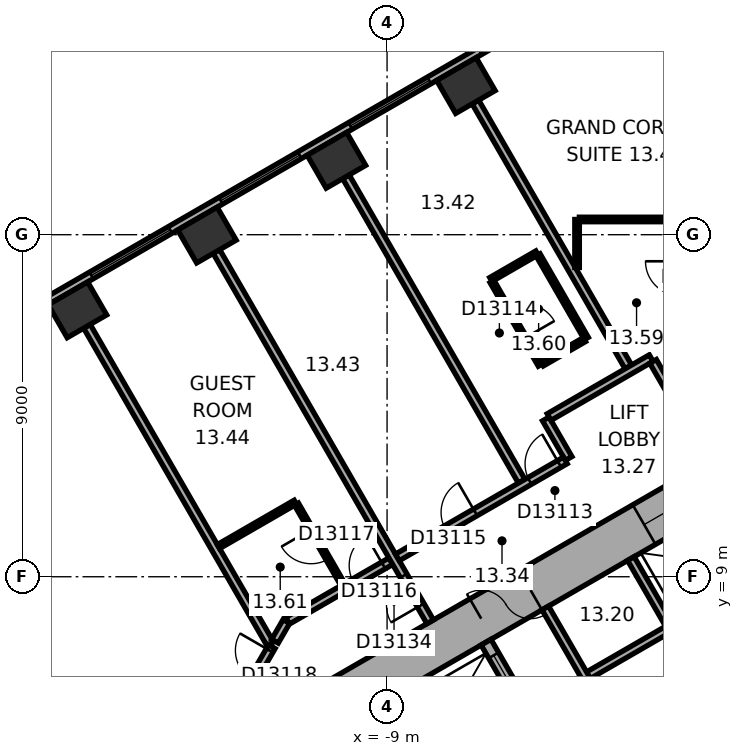
"""IFC4 building model, lengths in metres.
Left out: names, types, materials, properties, quantities, classifications, styles, units other than length and angle.
Written with IfcOpenShell. Run it as: python <this file> out.ifc"""

import sys

from ifc_helpers import new_model, si_unit, direction, frame, frame_2d, origin, origin_2d, place, context, subcontext, project, spatial, rectangle, extrude, element, fill, save


model = new_model("IFC4")
c1 = context("Model", 3, precision=1e-05, world=origin(), true_north=direction((0.0, 1.0)))
c2 = subcontext(c1, "Body", "Model", "MODEL_VIEW")
j1 = project(units=[si_unit("LENGTHUNIT", "METRE"), si_unit("PLANEANGLEUNIT", "RADIAN")], contexts=[c1])
p1 = place(None, origin())
s1 = spatial("IfcSite", under=j1, at=p1, CompositionType="ELEMENT")
p2 = place(p1, origin())
s2 = spatial("IfcBuilding", under=s1, at=p2, CompositionType="ELEMENT")
p3 = place(p2, frame((0.0, 0.0, 63.8)))
s3 = spatial("IfcBuildingStorey", under=s2, at=p3, CompositionType="ELEMENT", Elevation=63.8)
for number, where, z_axis, x_axis in (
    (1, (-6.926, 21.925, 0.0), (0.0, 0.0, 1.0), (-0.866, -0.5, 0.0)),
    (2, (-10.333, 19.957, 0.0), (0.0, 0.0, 1.0), (-0.866, -0.5, 0.0)),
    (3, (-13.74, 17.99, 0.0), (0.0, 0.0, 1.0), (-0.866, -0.5, 0.0)),
    (4, (-17.148, 16.023, 0.0), (0.0, 0.0, 1.0), (-0.866, -0.5, 0.0)),
):
    element("IfcColumn", number, at=place(p3, frame(where, z_axis=z_axis, x_axis=x_axis)), inside=s3, PredefinedType="COLUMN", context=c2, shape_type="SweptSolid", body=[
        extrude(rectangle(XDim=1.2, YDim=1.0, at=origin_2d()), origin(), (0.0, 0.0, 1.0), 3.3),
    ])
p4 = place(p3, frame((0.3, 11.836, 0.0), z_axis=(0.0, 0.0, 1.0), x_axis=(-0.866021384402, -0.500006961711, 0.0)))
e5 = element("IfcWall", 5, at=p4, inside=s3, PredefinedType="SHEAR", context=c2, shape_type="SweptSolid", body=[
    extrude(rectangle(XDim=12.355, YDim=1.2, at=frame_2d((6.178, 0.0))), origin(), (0.0, 0.0, 1.0), 3.3),
])
p5 = place(p4, frame((6.378, 0.0, 0.0)))
e6 = element("IfcOpeningElement", 6, at=p5, cuts=e5, PredefinedType="OPENING", context=c2, shape_type="SweptSolid", body=[
    extrude(rectangle(XDim=1.5, YDim=2.1, at=frame_2d((0.75, 1.05))), frame((0.0, 0.61, 0.0), z_axis=(0.0, -1.0, 0.0), x_axis=(1.0, 0.0, 0.0)), (0.0, 0.0, 1.0), 1.22),
])
p6 = place(p4, frame((1.828, 0.0, 0.0)))
e7 = element("IfcOpeningElement", 7, at=p6, cuts=e5, PredefinedType="OPENING", context=c2, shape_type="SweptSolid", body=[
    extrude(rectangle(XDim=1.1, YDim=2.1, at=frame_2d((0.55, 1.05))), frame((0.0, 0.61, 0.0), z_axis=(0.0, -1.0, 0.0), x_axis=(1.0, 0.0, 0.0)), (0.0, 0.0, 1.0), 1.22),
])
p7 = place(p3, frame((-3.136, 24.805, 0.0), z_axis=(0.0, 0.0, 1.0), x_axis=(-0.866028291626, -0.499994998079, 0.0)))
e8 = element("IfcWall", 8, at=p7, inside=s3, PredefinedType="STANDARD", context=c2, shape_type="SweptSolid", body=[
    extrude(rectangle(XDim=21.246, YDim=0.2, at=frame_2d((10.623, 0.0))), origin(), (0.0, 0.0, 1.0), 3.3),
])
p8 = place(p7, frame((1.555, 0.0, 0.8)))
e9 = element("IfcOpeningElement", 9, at=p8, cuts=e8, PredefinedType="OPENING", context=c2, shape_type="SweptSolid", body=[
    extrude(rectangle(XDim=2.4, YDim=1.7, at=frame_2d((1.2, 0.85))), frame((0.0, 0.11, 0.0), z_axis=(0.0, -1.0, 0.0), x_axis=(1.0, 0.0, 0.0)), (0.0, 0.0, 1.0), 0.22),
])
p9 = place(p7, frame((5.489, 0.0, 0.8)))
e10 = element("IfcOpeningElement", 10, at=p9, cuts=e8, PredefinedType="OPENING", context=c2, shape_type="SweptSolid", body=[
    extrude(rectangle(XDim=2.4, YDim=1.7, at=frame_2d((1.2, 0.85))), frame((0.0, 0.11, 0.0), z_axis=(0.0, -1.0, 0.0), x_axis=(1.0, 0.0, 0.0)), (0.0, 0.0, 1.0), 0.22),
])
p10 = place(p7, frame((9.424, 0.0, 0.8)))
e11 = element("IfcOpeningElement", 11, at=p10, cuts=e8, PredefinedType="OPENING", context=c2, shape_type="SweptSolid", body=[
    extrude(rectangle(XDim=2.4, YDim=1.7, at=frame_2d((1.2, 0.85))), frame((0.0, 0.11, 0.0), z_axis=(0.0, -1.0, 0.0), x_axis=(1.0, 0.0, 0.0)), (0.0, 0.0, 1.0), 0.22),
])
p11 = place(p7, frame((13.358, 0.0, 0.8)))
e12 = element("IfcOpeningElement", 12, at=p11, cuts=e8, PredefinedType="OPENING", context=c2, shape_type="SweptSolid", body=[
    extrude(rectangle(XDim=2.4, YDim=1.7, at=frame_2d((1.2, 0.85))), frame((0.0, 0.11, 0.0), z_axis=(0.0, -1.0, 0.0), x_axis=(1.0, 0.0, 0.0)), (0.0, 0.0, 1.0), 0.22),
])
p12 = place(p7, frame((17.293, 0.0, 0.8)))
e13 = element("IfcOpeningElement", 13, at=p12, cuts=e8, PredefinedType="OPENING", context=c2, shape_type="SweptSolid", body=[
    extrude(rectangle(XDim=2.4, YDim=1.7, at=frame_2d((1.2, 0.85))), frame((0.0, 0.11, 0.0), z_axis=(0.0, -1.0, 0.0), x_axis=(1.0, 0.0, 0.0)), (0.0, 0.0, 1.0), 0.22),
])
p13 = place(p3, frame((0.803, 9.009, 0.0), z_axis=(0.0, 0.0, 1.0), x_axis=(-0.866028230842, -0.499995103361, 0.0)))
e14 = element("IfcWall", 14, at=p13, inside=s3, PredefinedType="PARTITIONING", context=c2, shape_type="SweptSolid", body=[
    extrude(rectangle(XDim=5.4, YDim=0.2, at=frame_2d((2.7, 0.0))), origin(), (0.0, 0.0, 1.0), 3.05),
])
for number, where, z_axis, x_axis in (
    (15, (-1.485, 7.572, 0.0), (0.0, 0.0, 1.0), (-0.5, 0.866, 0.0)),
    (16, (-3.737, 6.272, 0.0), (0.0, 0.0, 1.0), (-0.5, 0.866, 0.0)),
):
    element("IfcWall", number, at=place(p3, frame(where, z_axis=z_axis, x_axis=x_axis)), inside=s3, PredefinedType="PARTITIONING", context=c2, shape_type="SweptSolid", body=[
        extrude(rectangle(XDim=2.2, YDim=0.2, at=frame_2d((1.1, 0.0))), origin(), (0.0, 0.0, 1.0), 3.05),
    ])
p14 = place(p3, frame((-2.216, 4.282, 0.0), z_axis=(0.0, 0.0, 1.0), x_axis=(0.499977259774, 0.866038532462, 0.0)))
e17 = element("IfcWall", 17, at=p14, inside=s3, PredefinedType="SHEAR", context=c2, shape_type="SweptSolid", body=[
    extrude(rectangle(XDim=4.7, YDim=0.3, at=frame_2d((2.35, 0.0))), origin(), (0.0, 0.0, 1.0), 3.05),
])
p15 = place(p3, frame((-5.295, 5.372, 0.0), z_axis=(0.0, 0.0, 1.0), x_axis=(-0.500077893725, 0.86598042715, 0.0)))
e18 = element("IfcWall", 18, at=p15, inside=s3, PredefinedType="SHEAR", context=c2, shape_type="SweptSolid", body=[
    extrude(rectangle(XDim=2.2, YDim=0.3, at=frame_2d((1.1, 0.0))), origin(), (0.0, 0.0, 1.0), 3.05),
])
p16 = place(p15, frame((0.7, 0.0, 0.0)))
e19 = element("IfcOpeningElement", 19, at=p16, cuts=e18, PredefinedType="OPENING", context=c2, shape_type="SweptSolid", body=[
    extrude(rectangle(XDim=1.1, YDim=2.1, at=frame_2d((0.55, 1.05))), frame((0.0, 0.16, 0.0), z_axis=(0.0, -1.0, 0.0), x_axis=(1.0, 0.0, 0.0)), (0.0, 0.0, 1.0), 0.32),
])
p17 = place(p3, frame((-16.898, 15.59, 0.0), z_axis=(0.0, 0.0, 1.0), x_axis=(0.499994742786, -0.866028439017, 0.0)))
e20 = element("IfcWall", 20, at=p17, inside=s3, PredefinedType="PARTITIONING", context=c2, shape_type="SweptSolid", body=[
    extrude(rectangle(XDim=9.65, YDim=0.2, at=frame_2d((4.825, 0.0))), origin(), (0.0, 0.0, 1.0), 3.05),
])
p18 = place(p3, frame((-13.436, 9.794, 0.0), z_axis=(0.0, 0.0, 1.0), x_axis=(0.866053246676, 0.499951771596, 0.0)))
e21 = element("IfcWall", 21, at=p18, inside=s3, PredefinedType="PARTITIONING", context=c2, shape_type="SweptSolid", body=[
    extrude(rectangle(XDim=2.335, YDim=0.12, at=frame_2d((1.167, 0.0))), origin(), (0.0, 0.0, 1.0), 3.05),
])
p19 = place(p3, frame((-12.032, 7.162, 0.0), z_axis=(0.0, 0.0, 1.0), x_axis=(-0.499951829968, -0.866053212979, 0.0)))
e22 = element("IfcWall", 22, at=p19, inside=s3, PredefinedType="PARTITIONING", context=c2, shape_type="SweptSolid", body=[
    extrude(rectangle(XDim=1.136, YDim=0.2, at=frame_2d((0.568, 0.0))), origin(), (0.0, 0.0, 1.0), 3.05),
])
p20 = place(p19, frame((0.118, 0.0, 0.0)))
e23 = element("IfcOpeningElement", 23, at=p20, cuts=e22, PredefinedType="OPENING", context=c2, shape_type="SweptSolid", body=[
    extrude(rectangle(XDim=0.9, YDim=2.1, at=frame_2d((0.45, 1.05))), frame((0.0, 0.11, 0.0), z_axis=(0.0, -1.0, 0.0), x_axis=(1.0, 0.0, 0.0)), (0.0, 0.0, 1.0), 0.22),
])
p21 = place(p3, frame((-11.65, 7.823, 0.0), z_axis=(0.0, 0.0, 1.0), x_axis=(-0.50012165622, -0.865955154139, 0.0)))
e24 = element("IfcWall", 24, at=p21, inside=s3, PredefinedType="PARTITIONING", context=c2, shape_type="SweptSolid", body=[
    extrude(rectangle(XDim=0.6, YDim=0.2, at=frame_2d((0.3, 0.0))), origin(), (0.0, 0.0, 1.0), 3.05),
])
p22 = place(p3, frame((-11.385, 10.909, 0.0), z_axis=(0.0, 0.0, 1.0), x_axis=(0.500077547548, -0.865980627057, 0.0)))
e25 = element("IfcWall", 25, at=p22, inside=s3, PredefinedType="PARTITIONING", context=c2, shape_type="SweptSolid", body=[
    extrude(rectangle(XDim=2.44, YDim=0.12, at=frame_2d((1.22, 0.0))), origin(), (0.0, 0.0, 1.0), 3.05),
])
p23 = place(p22, frame((0.77, 0.0, 0.0)))
e26 = element("IfcOpeningElement", 26, at=p23, cuts=e25, PredefinedType="OPENING", context=c2, shape_type="SweptSolid", body=[
    extrude(rectangle(XDim=0.9, YDim=2.1, at=frame_2d((0.45, 1.05))), frame((0.0, 0.07, 0.0), z_axis=(0.0, -1.0, 0.0), x_axis=(1.0, 0.0, 0.0)), (0.0, 0.0, 1.0), 0.14),
])
p24 = place(p3, frame((-10.083, 19.524, 0.0), z_axis=(0.0, 0.0, 1.0), x_axis=(0.499999662836, -0.866025598446, 0.0)))
e27 = element("IfcWall", 27, at=p24, inside=s3, PredefinedType="PARTITIONING", context=c2, shape_type="SweptSolid", body=[
    extrude(rectangle(XDim=9.25, YDim=0.2, at=frame_2d((4.625, 0.0))), origin(), (0.0, 0.0, 1.0), 2.6),
])
p25 = place(p3, frame((-8.902, 9.41, 0.0), z_axis=(0.0, 0.0, 1.0), x_axis=(-0.866014299198, -0.500019233215, 0.0)))
e28 = element("IfcWall", 28, at=p25, inside=s3, PredefinedType="PARTITIONING", context=c2, shape_type="SweptSolid", body=[
    extrude(rectangle(XDim=3.133, YDim=0.2, at=frame_2d((1.567, 0.0))), origin(), (0.0, 0.0, 1.0), 3.05),
])
p26 = place(p25, frame((0.225, 0.0, 0.0)))
e29 = element("IfcOpeningElement", 29, at=p26, cuts=e28, PredefinedType="OPENING", context=c2, shape_type="SweptSolid", body=[
    extrude(rectangle(XDim=0.9, YDim=2.1, at=frame_2d((0.45, 1.05))), frame((0.0, 0.11, 0.0), z_axis=(0.0, -1.0, 0.0), x_axis=(1.0, 0.0, 0.0)), (0.0, 0.0, 1.0), 0.22),
])
p27 = place(p3, frame((-7.865, 7.814, 0.0), z_axis=(0.0, 0.0, 1.0), x_axis=(-0.500004234368, 0.866022959057, 0.0)))
e30 = element("IfcWall", 30, at=p27, inside=s3, PredefinedType="PARTITIONING", context=c2, shape_type="SweptSolid", body=[
    extrude(rectangle(XDim=11.25, YDim=0.2, at=frame_2d((5.625, 0.0))), origin(), (0.0, 0.0, 1.0), 3.05),
])
p28 = place(p27, frame((0.5, 0.0, 0.0)))
e31 = element("IfcOpeningElement", 31, at=p28, cuts=e30, PredefinedType="OPENING", context=c2, shape_type="SweptSolid", body=[
    extrude(rectangle(XDim=0.9, YDim=2.1, at=frame_2d((0.45, 1.05))), frame((0.0, 0.11, 0.0), z_axis=(0.0, -1.0, 0.0), x_axis=(1.0, 0.0, 0.0)), (0.0, 0.0, 1.0), 0.22),
])
p29 = place(p3, frame((-6.676, 21.492, 0.0), z_axis=(0.0, 0.0, 1.0), x_axis=(0.500011263043, -0.866018900966, 0.0)))
e32 = element("IfcWall", 32, at=p29, inside=s3, PredefinedType="PARTITIONING", context=c2, shape_type="SweptSolid", body=[
    extrude(rectangle(XDim=8.049, YDim=0.2, at=frame_2d((4.024, 0.0))), origin(), (0.0, 0.0, 1.0), 3.05),
])
p30 = place(p3, frame((-6.268, 16.82, 0.0), z_axis=(0.0, 0.0, 1.0), x_axis=(0.866002662425, 0.500039387122, 0.0)))
e33 = element("IfcWall", 33, at=p30, inside=s3, PredefinedType="PARTITIONING", context=c2, shape_type="SweptSolid", body=[
    extrude(rectangle(XDim=1.4, YDim=0.12, at=frame_2d((0.7, 0.0))), origin(), (0.0, 0.0, 1.0), 3.05),
])
p31 = place(p3, frame((-5.026, 17.469, 0.0), z_axis=(0.0, 0.0, 1.0), x_axis=(0.500005339912, -0.866022320763, 0.0)))
e34 = element("IfcWall", 34, at=p31, inside=s3, PredefinedType="PARTITIONING", context=c2, shape_type="SweptSolid", body=[
    extrude(rectangle(XDim=2.54, YDim=0.12, at=frame_2d((1.27, 0.0))), origin(), (0.0, 0.0, 1.0), 3.05),
])
p32 = place(p3, frame((-4.968, 14.569, 0.0), z_axis=(0.0, 0.0, 1.0), x_axis=(-0.500046963369, 0.865998287773, 0.0)))
e35 = element("IfcWall", 35, at=p32, inside=s3, PredefinedType="PARTITIONING", context=c2, shape_type="SweptSolid", body=[
    extrude(rectangle(XDim=2.54, YDim=0.12, at=frame_2d((1.27, 0.0))), origin(), (0.0, 0.0, 1.0), 3.05),
])
p33 = place(p32, frame((0.82, 0.0, 0.0)))
e36 = element("IfcOpeningElement", 36, at=p33, cuts=e35, PredefinedType="OPENING", context=c2, shape_type="SweptSolid", body=[
    extrude(rectangle(XDim=0.9, YDim=2.1, at=frame_2d((0.45, 1.05))), frame((0.0, 0.07, 0.0), z_axis=(0.0, -1.0, 0.0), x_axis=(1.0, 0.0, 0.0)), (0.0, 0.0, 1.0), 0.14),
])
p34 = place(p3, frame((-4.823, 13.152, 0.0), z_axis=(0.0, 0.0, 1.0), x_axis=(0.499986357472, -0.866033280158, 0.0)))
e37 = element("IfcWall", 37, at=p34, inside=s3, PredefinedType="PARTITIONING", context=c2, shape_type="SweptSolid", body=[
    extrude(rectangle(XDim=1.201, YDim=0.2, at=frame_2d((0.601, 0.0))), origin(), (0.0, 0.0, 1.0), 3.05),
])
p35 = place(p3, frame((-4.309, 12.061, 0.0), z_axis=(0.0, 0.0, 1.0), x_axis=(-0.866020679205, -0.500008183122, 0.0)))
e38 = element("IfcWall", 38, at=p35, inside=s3, PredefinedType="PARTITIONING", context=c2, shape_type="SweptSolid", body=[
    extrude(rectangle(XDim=5.104, YDim=0.2, at=frame_2d((2.552, 0.0))), origin(), (0.0, 0.0, 1.0), 3.05),
])
p36 = place(p35, frame((0.185, 0.0, 0.0)))
e39 = element("IfcOpeningElement", 39, at=p36, cuts=e38, PredefinedType="OPENING", context=c2, shape_type="SweptSolid", body=[
    extrude(rectangle(XDim=0.9, YDim=2.1, at=frame_2d((0.45, 1.05))), frame((0.0, 0.11, 0.0), z_axis=(0.0, -1.0, 0.0), x_axis=(1.0, 0.0, 0.0)), (0.0, 0.0, 1.0), 0.22),
])
p37 = place(p35, frame((2.736, 0.0, 0.0)))
e40 = element("IfcOpeningElement", 40, at=p37, cuts=e38, PredefinedType="OPENING", context=c2, shape_type="SweptSolid", body=[
    extrude(rectangle(XDim=0.9, YDim=2.1, at=frame_2d((0.45, 1.05))), frame((0.0, 0.11, 0.0), z_axis=(0.0, -1.0, 0.0), x_axis=(1.0, 0.0, 0.0)), (0.0, 0.0, 1.0), 0.22),
])
p38 = place(p3, frame((-4.0, 17.137, 0.0), z_axis=(0.0, 0.0, 1.0), x_axis=(0.0, 1.0, 0.0)))
e41 = element("IfcWall", 41, at=p38, inside=s3, PredefinedType="PARTITIONING", context=c2, shape_type="SweptSolid", body=[
    extrude(rectangle(XDim=1.263, YDim=0.12, at=frame_2d((0.632, 0.0))), origin(), (0.0, 0.0, 1.0), 3.05),
])
p39 = place(p3, frame((-3.94, 18.401, 0.0), z_axis=(0.0, 0.0, 1.0), x_axis=(1.0, 0.0, 0.0)))
e42 = element("IfcWall", 42, at=p39, inside=s3, PredefinedType="PARTITIONING", context=c2, shape_type="SweptSolid", body=[
    extrude(rectangle(XDim=2.64, YDim=0.12, at=frame_2d((1.32, 0.0))), origin(), (0.0, 0.0, 1.0), 3.05),
])
p40 = place(p3, frame((-3.808, 15.239, 0.0), z_axis=(0.0, 0.0, 1.0), x_axis=(-0.866087136806, -0.499893060024, 0.0)))
e43 = element("IfcWall", 43, at=p40, inside=s3, PredefinedType="PARTITIONING", context=c2, shape_type="SweptSolid", body=[
    extrude(rectangle(XDim=1.28, YDim=0.12, at=frame_2d((0.64, 0.0))), origin(), (0.0, 0.0, 1.0), 3.05),
])
p41 = place(p3, frame((-2.05, 14.752, 0.0), z_axis=(0.0, 0.0, 1.0), x_axis=(-0.866030936828, -0.499990416364, 0.0)))
e44 = element("IfcWall", 44, at=p41, inside=s3, PredefinedType="PARTITIONING", context=c2, shape_type="SweptSolid", body=[
    extrude(rectangle(XDim=3.102, YDim=0.2, at=frame_2d((1.551, 0.0))), origin(), (0.0, 0.0, 1.0), 3.05),
])
p42 = place(p3, frame((-1.449, 13.712, 0.0), z_axis=(0.0, 0.0, 1.0), x_axis=(-0.499978356969, 0.866037899034, 0.0)))
e45 = element("IfcWall", 45, at=p42, inside=s3, PredefinedType="PARTITIONING", context=c2, shape_type="SweptSolid", body=[
    extrude(rectangle(XDim=1.101, YDim=0.2, at=frame_2d((0.551, 0.0))), origin(), (0.0, 0.0, 1.0), 3.05),
])
p43 = place(p3, frame((-1.3, 15.301, 0.0), z_axis=(0.0, 0.0, 1.0), x_axis=(-1.0, 0.0, 0.0)))
e46 = element("IfcWall", 46, at=p43, inside=s3, PredefinedType="PARTITIONING", context=c2, shape_type="SweptSolid", body=[
    extrude(rectangle(XDim=1.661, YDim=0.12, at=frame_2d((0.831, 0.0))), origin(), (0.0, 0.0, 1.0), 3.05),
])
p44 = place(p9, origin())
e47 = element("IfcWindow", 47, at=p44, inside=s3, PartitioningType="SINGLE_PANEL", PredefinedType="WINDOW", context=c2, shape_type="SweptSolid", body=[
    extrude(rectangle(XDim=2.4, YDim=1.7, at=frame_2d((1.2, 0.85))), frame((0.0, 0.03, 0.0), z_axis=(0.0, -1.0, 0.0), x_axis=(1.0, 0.0, 0.0)), (0.0, 0.0, 1.0), 0.06),
])
fill(e10, e47)
p45 = place(p10, origin())
e48 = element("IfcWindow", 48, at=p45, inside=s3, PartitioningType="SINGLE_PANEL", PredefinedType="WINDOW", context=c2, shape_type="SweptSolid", body=[
    extrude(rectangle(XDim=2.4, YDim=1.7, at=frame_2d((1.2, 0.85))), frame((0.0, 0.03, 0.0), z_axis=(0.0, -1.0, 0.0), x_axis=(1.0, 0.0, 0.0)), (0.0, 0.0, 1.0), 0.06),
])
fill(e11, e48)
p46 = place(p11, origin())
e49 = element("IfcWindow", 49, at=p46, inside=s3, PartitioningType="SINGLE_PANEL", PredefinedType="WINDOW", context=c2, shape_type="SweptSolid", body=[
    extrude(rectangle(XDim=2.4, YDim=1.7, at=frame_2d((1.2, 0.85))), frame((0.0, 0.03, 0.0), z_axis=(0.0, -1.0, 0.0), x_axis=(1.0, 0.0, 0.0)), (0.0, 0.0, 1.0), 0.06),
])
fill(e12, e49)
p47 = place(p5, origin())
e50 = element("IfcDoor", 50, at=p47, inside=s3, OperationType="DOUBLE_DOOR_SINGLE_SWING", PredefinedType="DOOR", context=c2, shape_type="SweptSolid", body=[
    extrude(rectangle(XDim=1.5, YDim=2.1, at=frame_2d((0.75, 1.05))), frame((0.0, 0.025, 0.0), z_axis=(0.0, -1.0, 0.0), x_axis=(1.0, 0.0, 0.0)), (0.0, 0.0, 1.0), 0.05),
])
fill(e6, e50)
p48 = place(p16, origin())
e51 = element("IfcDoor", 51, at=p48, inside=s3, OperationType="DOUBLE_DOOR_SLIDING", PredefinedType="DOOR", context=c2, shape_type="SweptSolid", body=[
    extrude(rectangle(XDim=1.1, YDim=2.1, at=frame_2d((0.55, 1.05))), frame((0.0, 0.025, 0.0), z_axis=(0.0, -1.0, 0.0), x_axis=(1.0, 0.0, 0.0)), (0.0, 0.0, 1.0), 0.05),
])
fill(e19, e51)
p49 = place(p6, origin())
e52 = element("IfcDoor", 52, at=p49, inside=s3, OperationType="DOUBLE_DOOR_SLIDING", PredefinedType="DOOR", context=c2, shape_type="SweptSolid", body=[
    extrude(rectangle(XDim=1.1, YDim=2.1, at=frame_2d((0.55, 1.05))), frame((0.0, 0.025, 0.0), z_axis=(0.0, -1.0, 0.0), x_axis=(1.0, 0.0, 0.0)), (0.0, 0.0, 1.0), 0.05),
])
fill(e7, e52)
p50 = place(p36, origin())
e53 = element("IfcDoor", 53, at=p50, inside=s3, OperationType="SINGLE_SWING_LEFT", PredefinedType="DOOR", context=c2, shape_type="SweptSolid", body=[
    extrude(rectangle(XDim=0.9, YDim=2.1, at=frame_2d((0.45, 1.05))), frame((0.0, 0.025, 0.0), z_axis=(0.0, -1.0, 0.0), x_axis=(1.0, 0.0, 0.0)), (0.0, 0.0, 1.0), 0.05),
])
fill(e39, e53)
p51 = place(p33, origin())
e54 = element("IfcDoor", 54, at=p51, inside=s3, OperationType="SINGLE_SWING_LEFT", PredefinedType="DOOR", context=c2, shape_type="SweptSolid", body=[
    extrude(rectangle(XDim=0.9, YDim=2.1, at=frame_2d((0.45, 1.05))), frame((0.0, 0.025, 0.0), z_axis=(0.0, -1.0, 0.0), x_axis=(1.0, 0.0, 0.0)), (0.0, 0.0, 1.0), 0.05),
])
fill(e36, e54)
p52 = place(p37, origin())
e55 = element("IfcDoor", 55, at=p52, inside=s3, OperationType="SINGLE_SWING_LEFT", PredefinedType="DOOR", context=c2, shape_type="SweptSolid", body=[
    extrude(rectangle(XDim=0.9, YDim=2.1, at=frame_2d((0.45, 1.05))), frame((0.0, 0.025, 0.0), z_axis=(0.0, -1.0, 0.0), x_axis=(1.0, 0.0, 0.0)), (0.0, 0.0, 1.0), 0.05),
])
fill(e40, e55)
p53 = place(p26, origin())
e56 = element("IfcDoor", 56, at=p53, inside=s3, OperationType="SINGLE_SWING_LEFT", PredefinedType="DOOR", context=c2, shape_type="SweptSolid", body=[
    extrude(rectangle(XDim=0.9, YDim=2.1, at=frame_2d((0.45, 1.05))), frame((0.0, 0.025, 0.0), z_axis=(0.0, -1.0, 0.0), x_axis=(1.0, 0.0, 0.0)), (0.0, 0.0, 1.0), 0.05),
])
fill(e29, e56)
p54 = place(p23, origin())
e57 = element("IfcDoor", 57, at=p54, inside=s3, OperationType="SINGLE_SWING_LEFT", PredefinedType="DOOR", context=c2, shape_type="SweptSolid", body=[
    extrude(rectangle(XDim=0.9, YDim=2.1, at=frame_2d((0.45, 1.05))), frame((0.0, 0.025, 0.0), z_axis=(0.0, -1.0, 0.0), x_axis=(1.0, 0.0, 0.0)), (0.0, 0.0, 1.0), 0.05),
])
fill(e26, e57)
p55 = place(p20, origin())
e58 = element("IfcDoor", 58, at=p55, inside=s3, OperationType="SINGLE_SWING_LEFT", PredefinedType="DOOR", context=c2, shape_type="SweptSolid", body=[
    extrude(rectangle(XDim=0.9, YDim=2.1, at=frame_2d((0.45, 1.05))), frame((0.0, 0.025, 0.0), z_axis=(0.0, -1.0, 0.0), x_axis=(1.0, 0.0, 0.0)), (0.0, 0.0, 1.0), 0.05),
])
fill(e23, e58)
p56 = place(p28, origin())
e59 = element("IfcDoor", 59, at=p56, inside=s3, OperationType="SINGLE_SWING_LEFT", PredefinedType="DOOR", context=c2, shape_type="SweptSolid", body=[
    extrude(rectangle(XDim=0.9, YDim=2.1, at=frame_2d((0.45, 1.05))), frame((0.0, 0.025, 0.0), z_axis=(0.0, -1.0, 0.0), x_axis=(1.0, 0.0, 0.0)), (0.0, 0.0, 1.0), 0.05),
])
fill(e31, e59)
save(model, sys.argv[1])
